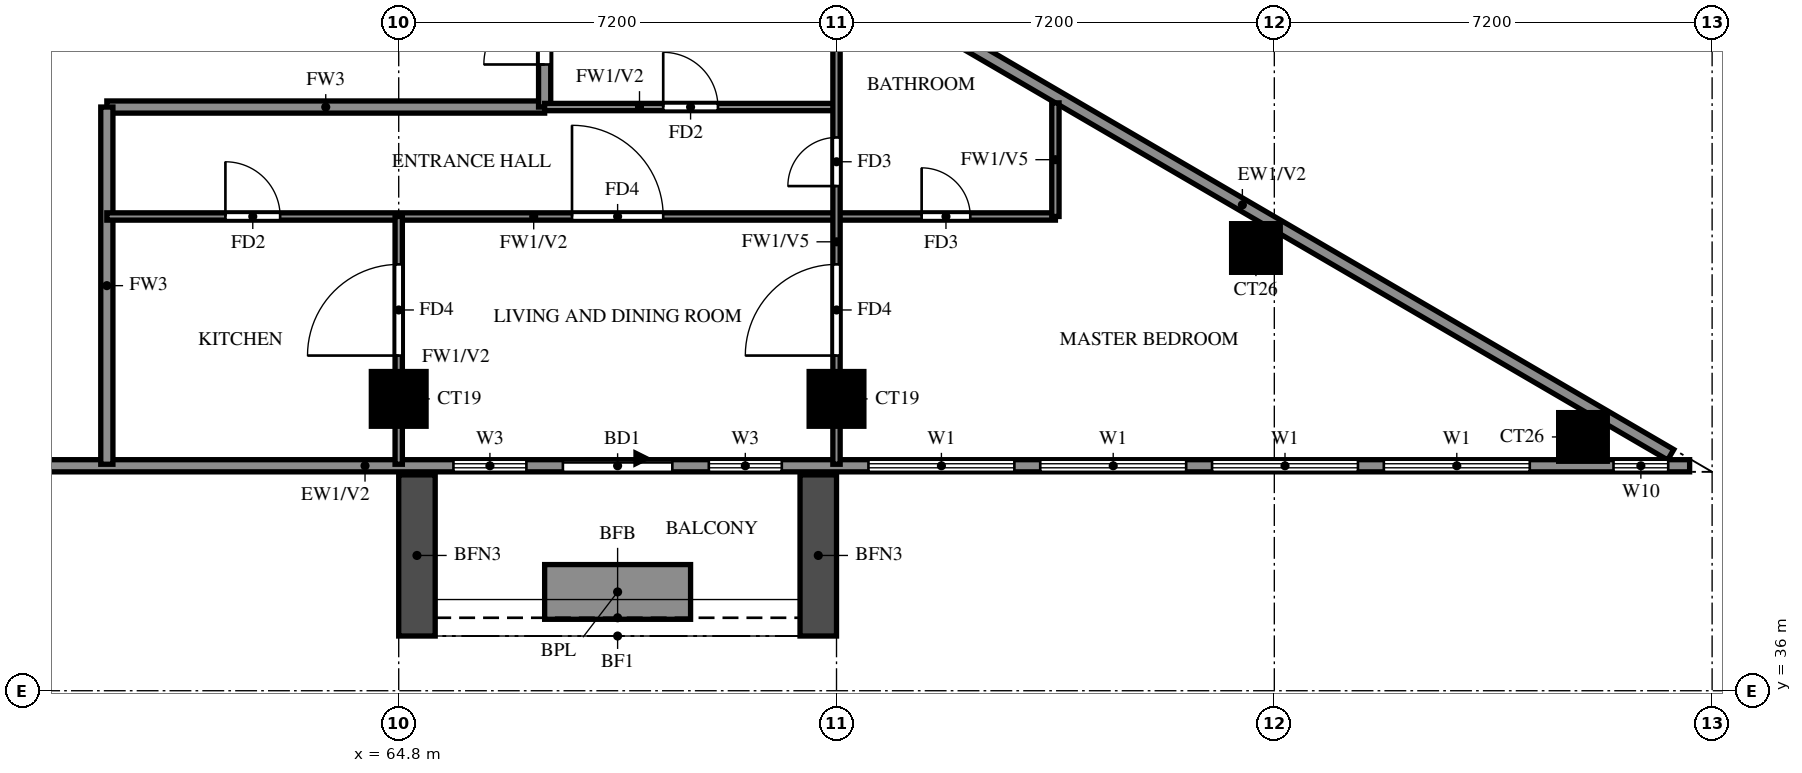
"""IFC4 building model, lengths in metres.
Left out: names, types, materials, properties, quantities, classifications, styles, units other than length and angle.
Written with IfcOpenShell. Run it as: python <this file> out.ifc"""

import sys

from ifc_helpers import new_model, si_unit, direction, frame, frame_2d, origin, origin_2d, place, context, subcontext, project, spatial, rectangle, extrude, source, transform, mapped, element, fill, save


model = new_model("IFC4")
c1 = context("Model", 3, precision=1e-05, world=origin(), true_north=direction((0.0, 1.0)))
c2 = subcontext(c1, "Body", "Model", "MODEL_VIEW")
j1 = project(units=[si_unit("LENGTHUNIT", "METRE"), si_unit("PLANEANGLEUNIT", "RADIAN")], contexts=[c1])
p1 = place(None, origin())
s1 = spatial("IfcSite", under=j1, at=p1, CompositionType="ELEMENT")
p2 = place(p1, origin())
s2 = spatial("IfcBuilding", under=s1, at=p2, CompositionType="ELEMENT")
p3 = place(p2, frame((0.0, 0.0, 188.5)))
s3 = spatial("IfcBuildingStorey", under=s2, at=p3, CompositionType="ELEMENT", Elevation=188.5)
m1 = source(origin(), c2, "Body", "SweptSolid", [
    extrude(rectangle(XDim=0.8, YDim=0.8, at=origin_2d()), origin(), (0.0, 0.0, 1.0), 3.2),
])
p4 = place(p3, frame((84.276, 40.174, 0.0), z_axis=(0.0, 0.0, 1.0), x_axis=(1.0, 0.0, 0.0)))
e1 = element("IfcColumn", 1, at=p4, inside=s3, PredefinedType="COLUMN", context=c2, shape_type="MappedRepresentation", body=[
    mapped(m1, transform((0.0, 0.0, 0.0))),
])
m2 = source(origin(), c2, "Body", "SweptSolid", [
    extrude(rectangle(XDim=0.9, YDim=0.9, at=origin_2d()), origin(), (0.0, 0.0, 1.0), 3.2),
])
for number, where, z_axis, x_axis in (
    (2, (64.8, 40.8, 0.0), (0.0, 0.0, 1.0), (1.0, 0.0, 0.0)),
    (3, (72.0, 40.8, 0.0), (0.0, 0.0, 1.0), (1.0, 0.0, 0.0)),
):
    element("IfcColumn", number, at=place(p3, frame(where, z_axis=z_axis, x_axis=x_axis)), inside=s3, PredefinedType="COLUMN", context=c2, shape_type="MappedRepresentation", body=[
        mapped(m2, transform((0.0, 0.0, 0.0))),
    ])
p5 = place(p3, frame((78.898, 43.282, 0.0), z_axis=(0.0, 0.0, 1.0), x_axis=(1.0, 0.0, 0.0)))
e4 = element("IfcColumn", 4, at=p5, inside=s3, PredefinedType="COLUMN", context=c2, shape_type="MappedRepresentation", body=[
    mapped(m1, transform((0.0, 0.0, 0.0))),
])
p6 = place(p3, frame((85.719, 39.881, 0.0), z_axis=(0.0, 0.0, 1.0), x_axis=(-0.86377618652, 0.503875678716, 0.0)))
e5 = element("IfcWall", 5, at=p6, inside=s3, PredefinedType="SOLIDWALL", context=c2, shape_type="SweptSolid", body=[
    extrude(rectangle(XDim=16.311, YDim=0.2, at=frame_2d((8.156, 0.0))), origin(), (0.0, 0.0, 1.0), 3.2),
])
p7 = place(p6, frame((13.326, 0.0, 1.5)))
e6 = element("IfcOpeningElement", 6, at=p7, cuts=e5, PredefinedType="OPENING", context=c2, shape_type="SweptSolid", body=[
    extrude(rectangle(XDim=0.9, YDim=0.9, at=frame_2d((0.45, 0.45))), frame((0.0, 0.11, 0.0), z_axis=(0.0, -1.0, 0.0), x_axis=(1.0, 0.0, 0.0)), (0.0, 0.0, 1.0), 0.22),
])
p8 = place(p3, frame((58.8, 39.7, 0.0), z_axis=(0.0, 0.0, 1.0), x_axis=(1.0, 0.0, 0.0)))
e7 = element("IfcWall", 7, at=p8, inside=s3, PredefinedType="SOLIDWALL", context=c2, shape_type="SweptSolid", body=[
    extrude(rectangle(XDim=27.23, YDim=0.2, at=frame_2d((13.615, 0.0))), origin(), (0.0, 0.0, 1.0), 3.2),
])
p9 = place(p8, frame((8.7, 0.0, 0.0)))
e8 = element("IfcOpeningElement", 8, at=p9, cuts=e7, PredefinedType="OPENING", context=c2, shape_type="SweptSolid", body=[
    extrude(rectangle(XDim=1.8, YDim=2.4, at=frame_2d((0.9, 1.2))), frame((0.0, 0.11, 0.0), z_axis=(0.0, -1.0, 0.0), x_axis=(1.0, 0.0, 0.0)), (0.0, 0.0, 1.0), 0.22),
])
p10 = place(p8, frame((6.9, 0.0, 0.6)))
e9 = element("IfcOpeningElement", 9, at=p10, cuts=e7, PredefinedType="OPENING", context=c2, shape_type="SweptSolid", body=[
    extrude(rectangle(XDim=1.2, YDim=2.4, at=frame_2d((0.6, 1.2))), frame((0.0, 0.11, 0.0), z_axis=(0.0, -1.0, 0.0), x_axis=(1.0, 0.0, 0.0)), (0.0, 0.0, 1.0), 0.22),
])
p11 = place(p8, frame((11.1, 0.0, 0.6)))
e10 = element("IfcOpeningElement", 10, at=p11, cuts=e7, PredefinedType="OPENING", context=c2, shape_type="SweptSolid", body=[
    extrude(rectangle(XDim=1.2, YDim=2.4, at=frame_2d((0.6, 1.2))), frame((0.0, 0.11, 0.0), z_axis=(0.0, -1.0, 0.0), x_axis=(1.0, 0.0, 0.0)), (0.0, 0.0, 1.0), 0.22),
])
p12 = place(p8, frame((13.725, 0.0, 0.6)))
e11 = element("IfcOpeningElement", 11, at=p12, cuts=e7, PredefinedType="OPENING", context=c2, shape_type="SweptSolid", body=[
    extrude(rectangle(XDim=2.4, YDim=2.4, at=frame_2d((1.2, 1.2))), frame((0.0, 0.11, 0.0), z_axis=(0.0, -1.0, 0.0), x_axis=(1.0, 0.0, 0.0)), (0.0, 0.0, 1.0), 0.22),
])
p13 = place(p8, frame((16.551, 0.0, 0.6)))
e12 = element("IfcOpeningElement", 12, at=p13, cuts=e7, PredefinedType="OPENING", context=c2, shape_type="SweptSolid", body=[
    extrude(rectangle(XDim=2.4, YDim=2.4, at=frame_2d((1.2, 1.2))), frame((0.0, 0.11, 0.0), z_axis=(0.0, -1.0, 0.0), x_axis=(1.0, 0.0, 0.0)), (0.0, 0.0, 1.0), 0.22),
])
p14 = place(p8, frame((19.376, 0.0, 0.6)))
e13 = element("IfcOpeningElement", 13, at=p14, cuts=e7, PredefinedType="OPENING", context=c2, shape_type="SweptSolid", body=[
    extrude(rectangle(XDim=2.4, YDim=2.4, at=frame_2d((1.2, 1.2))), frame((0.0, 0.11, 0.0), z_axis=(0.0, -1.0, 0.0), x_axis=(1.0, 0.0, 0.0)), (0.0, 0.0, 1.0), 0.22),
])
p15 = place(p8, frame((22.201, 0.0, 0.6)))
e14 = element("IfcOpeningElement", 14, at=p15, cuts=e7, PredefinedType="OPENING", context=c2, shape_type="SweptSolid", body=[
    extrude(rectangle(XDim=2.4, YDim=2.4, at=frame_2d((1.2, 1.2))), frame((0.0, 0.11, 0.0), z_axis=(0.0, -1.0, 0.0), x_axis=(1.0, 0.0, 0.0)), (0.0, 0.0, 1.0), 0.22),
])
p16 = place(p8, frame((25.978, 0.0, 0.6)))
e15 = element("IfcOpeningElement", 15, at=p16, cuts=e7, PredefinedType="OPENING", context=c2, shape_type="SweptSolid", body=[
    extrude(rectangle(XDim=0.9, YDim=2.4, at=frame_2d((0.45, 1.2))), frame((0.0, 0.11, 0.0), z_axis=(0.0, -1.0, 0.0), x_axis=(1.0, 0.0, 0.0)), (0.0, 0.0, 1.0), 0.22),
])
for number, where, z_axis, x_axis in (
    (16, (65.1, 39.55, 0.0), (0.0, 0.0, 1.0), (0.0, -1.0, 0.0)),
    (17, (71.7, 39.55, 0.0), (0.0, 0.0, 1.0), (0.0, -1.0, 0.0)),
):
    element("IfcWall", number, at=place(p3, frame(where, z_axis=z_axis, x_axis=x_axis)), inside=s3, PredefinedType="SOLIDWALL", context=c2, shape_type="SweptSolid", body=[
        extrude(rectangle(XDim=2.65, YDim=0.6, at=frame_2d((1.325, 0.0))), origin(), (0.0, 0.0, 1.0), 2.85),
    ])
p17 = place(p3, frame((67.2, 37.625, 0.0), z_axis=(0.0, 0.0, 1.0), x_axis=(1.0, 0.0, 0.0)))
e18 = element("IfcWall", 18, at=p17, inside=s3, PredefinedType="SOLIDWALL", context=c2, shape_type="SweptSolid", body=[
    extrude(rectangle(XDim=2.4, YDim=0.9, at=frame_2d((1.2, 0.0))), origin(), (0.0, 0.0, 1.0), 0.9),
])
p18 = place(p3, frame((60.0, 45.6, 0.0), z_axis=(0.0, 0.0, 1.0), x_axis=(1.0, 0.0, 0.0)))
e19 = element("IfcWall", 19, at=p18, inside=s3, PredefinedType="SOLIDWALL", context=c2, shape_type="SweptSolid", body=[
    extrude(rectangle(XDim=7.2, YDim=0.2, at=frame_2d((3.6, 0.0))), origin(), (0.0, 0.0, 1.0), 3.2),
])
p19 = place(p3, frame((60.0, 39.725, 0.0), z_axis=(0.0, 0.0, 1.0), x_axis=(0.0, 1.0, 0.0)))
e20 = element("IfcWall", 20, at=p19, inside=s3, PredefinedType="SOLIDWALL", context=c2, shape_type="SweptSolid", body=[
    extrude(rectangle(XDim=5.875, YDim=0.2, at=frame_2d((2.938, 0.0))), origin(), (0.0, 0.0, 1.0), 3.2),
])
p20 = place(p3, frame((67.2, 45.6, 0.0), z_axis=(0.0, 0.0, 1.0), x_axis=(0.0, 1.0, 0.0)))
e21 = element("IfcWall", 21, at=p20, inside=s3, PredefinedType="SOLIDWALL", context=c2, shape_type="SweptSolid", body=[
    extrude(rectangle(XDim=16.8, YDim=0.2, at=frame_2d((8.4, 0.0))), origin(), (0.0, 0.0, 1.0), 3.2),
])
p21 = place(p20, frame((8.3, 0.0, 0.0)))
e22 = element("IfcOpeningElement", 22, at=p21, cuts=e21, PredefinedType="OPENING", context=c2, shape_type="SweptSolid", body=[
    extrude(rectangle(XDim=1.0, YDim=2.1, at=frame_2d((0.5, 1.05))), frame((0.0, 0.11, 0.0), z_axis=(0.0, -1.0, 0.0), x_axis=(1.0, 0.0, 0.0)), (0.0, 0.0, 1.0), 0.22),
])
p22 = place(p20, frame((15.1, 0.0, 0.0)))
e23 = element("IfcOpeningElement", 23, at=p22, cuts=e21, PredefinedType="OPENING", context=c2, shape_type="SweptSolid", body=[
    extrude(rectangle(XDim=1.0, YDim=2.1, at=frame_2d((0.5, 1.05))), frame((0.0, 0.11, 0.0), z_axis=(0.0, -1.0, 0.0), x_axis=(1.0, 0.0, 0.0)), (0.0, 0.0, 1.0), 0.22),
])
p23 = place(p20, frame((0.7, 0.0, 0.0)))
e24 = element("IfcOpeningElement", 24, at=p23, cuts=e21, PredefinedType="OPENING", context=c2, shape_type="SweptSolid", body=[
    extrude(rectangle(XDim=1.0, YDim=2.1, at=frame_2d((0.5, 1.05))), frame((0.0, 0.11, 0.0), z_axis=(0.0, -1.0, 0.0), x_axis=(1.0, 0.0, 0.0)), (0.0, 0.0, 1.0), 0.22),
])
p24 = place(p3, frame((60.0, 43.8, 0.0), z_axis=(0.0, 0.0, 1.0), x_axis=(1.0, 0.0, 0.0)))
e25 = element("IfcWall", 25, at=p24, inside=s3, PredefinedType="PARTITIONING", context=c2, shape_type="SweptSolid", body=[
    extrude(rectangle(XDim=15.6, YDim=0.12, at=frame_2d((7.8, 0.0))), origin(), (0.0, 0.0, 1.0), 3.2),
])
p25 = place(p24, frame((7.65, 0.0, 0.0)))
e26 = element("IfcOpeningElement", 26, at=p25, cuts=e25, PredefinedType="OPENING", context=c2, shape_type="SweptSolid", body=[
    extrude(rectangle(XDim=1.5, YDim=2.1, at=frame_2d((0.75, 1.05))), frame((0.0, 0.07, 0.0), z_axis=(0.0, -1.0, 0.0), x_axis=(1.0, 0.0, 0.0)), (0.0, 0.0, 1.0), 0.14),
])
p26 = place(p24, frame((1.95, 0.0, 0.0)))
e27 = element("IfcOpeningElement", 27, at=p26, cuts=e25, PredefinedType="OPENING", context=c2, shape_type="SweptSolid", body=[
    extrude(rectangle(XDim=0.9, YDim=2.1, at=frame_2d((0.45, 1.05))), frame((0.0, 0.07, 0.0), z_axis=(0.0, -1.0, 0.0), x_axis=(1.0, 0.0, 0.0)), (0.0, 0.0, 1.0), 0.14),
])
p27 = place(p24, frame((13.4, 0.0, 0.0)))
e28 = element("IfcOpeningElement", 28, at=p27, cuts=e25, PredefinedType="OPENING", context=c2, shape_type="SweptSolid", body=[
    extrude(rectangle(XDim=0.8, YDim=2.1, at=frame_2d((0.4, 1.05))), frame((0.0, 0.07, 0.0), z_axis=(0.0, -1.0, 0.0), x_axis=(1.0, 0.0, 0.0)), (0.0, 0.0, 1.0), 0.14),
])
p28 = place(p3, frame((67.2, 45.6, 0.0), z_axis=(0.0, 0.0, 1.0), x_axis=(1.0, 0.0, 0.0)))
e29 = element("IfcWall", 29, at=p28, inside=s3, PredefinedType="PARTITIONING", context=c2, shape_type="SweptSolid", body=[
    extrude(rectangle(XDim=4.8, YDim=0.12, at=frame_2d((2.4, 0.0))), origin(), (0.0, 0.0, 1.0), 3.2),
])
p29 = place(p28, frame((1.95, 0.0, 0.0)))
e30 = element("IfcOpeningElement", 30, at=p29, cuts=e29, PredefinedType="OPENING", context=c2, shape_type="SweptSolid", body=[
    extrude(rectangle(XDim=0.9, YDim=2.1, at=frame_2d((0.45, 1.05))), frame((0.0, 0.07, 0.0), z_axis=(0.0, -1.0, 0.0), x_axis=(1.0, 0.0, 0.0)), (0.0, 0.0, 1.0), 0.14),
])
p30 = place(p3, frame((64.8, 39.725, 0.0), z_axis=(0.0, 0.0, 1.0), x_axis=(0.0, 1.0, 0.0)))
e31 = element("IfcWall", 31, at=p30, inside=s3, PredefinedType="PARTITIONING", context=c2, shape_type="SweptSolid", body=[
    extrude(rectangle(XDim=4.075, YDim=0.12, at=frame_2d((2.038, 0.0))), origin(), (0.0, 0.0, 1.0), 3.2),
])
p31 = place(p30, frame((1.788, 0.0, 0.0)))
e32 = element("IfcOpeningElement", 32, at=p31, cuts=e31, PredefinedType="OPENING", context=c2, shape_type="SweptSolid", body=[
    extrude(rectangle(XDim=1.5, YDim=2.1, at=frame_2d((0.75, 1.05))), frame((0.0, 0.07, 0.0), z_axis=(0.0, -1.0, 0.0), x_axis=(1.0, 0.0, 0.0)), (0.0, 0.0, 1.0), 0.14),
])
p32 = place(p3, frame((72.0, 39.725, 0.0), z_axis=(0.0, 0.0, 1.0), x_axis=(0.0, 1.0, 0.0)))
e33 = element("IfcWall", 33, at=p32, inside=s3, PredefinedType="PARTITIONING", context=c2, shape_type="SweptSolid", body=[
    extrude(rectangle(XDim=8.13, YDim=0.12, at=frame_2d((4.065, 0.0))), origin(), (0.0, 0.0, 1.0), 2.3),
])
p33 = place(p32, frame((1.788, 0.0, 0.0)))
e34 = element("IfcOpeningElement", 34, at=p33, cuts=e33, PredefinedType="OPENING", context=c2, shape_type="SweptSolid", body=[
    extrude(rectangle(XDim=1.5, YDim=2.1, at=frame_2d((0.75, 1.05))), frame((0.0, 0.07, 0.0), z_axis=(0.0, -1.0, 0.0), x_axis=(1.0, 0.0, 0.0)), (0.0, 0.0, 1.0), 0.14),
])
p34 = place(p32, frame((4.575, 0.0, 0.0)))
e35 = element("IfcOpeningElement", 35, at=p34, cuts=e33, PredefinedType="OPENING", context=c2, shape_type="SweptSolid", body=[
    extrude(rectangle(XDim=0.8, YDim=2.1, at=frame_2d((0.4, 1.05))), frame((0.0, 0.07, 0.0), z_axis=(0.0, -1.0, 0.0), x_axis=(1.0, 0.0, 0.0)), (0.0, 0.0, 1.0), 0.14),
])
p35 = place(p3, frame((75.6, 43.8, 0.0), z_axis=(0.0, 0.0, 1.0), x_axis=(0.0, 1.0, 0.0)))
e36 = element("IfcWall", 36, at=p35, inside=s3, PredefinedType="PARTITIONING", context=c2, shape_type="SweptSolid", body=[
    extrude(rectangle(XDim=1.868, YDim=0.12, at=frame_2d((0.934, 0.0))), origin(), (0.0, 0.0, 1.0), 2.3),
])
p36 = place(p9, origin())
e37 = element("IfcDoor", 37, at=p36, inside=s3, OperationType="DOUBLE_DOOR_SLIDING", PredefinedType="DOOR", context=c2, shape_type="SweptSolid", body=[
    extrude(rectangle(XDim=1.8, YDim=2.4, at=frame_2d((0.9, 1.2))), frame((0.0, 0.025, 0.0), z_axis=(0.0, -1.0, 0.0), x_axis=(1.0, 0.0, 0.0)), (0.0, 0.0, 1.0), 0.05),
])
fill(e8, e37)
p37 = place(p10, origin())
e38 = element("IfcWindow", 38, at=p37, inside=s3, PartitioningType="SINGLE_PANEL", PredefinedType="WINDOW", context=c2, shape_type="SweptSolid", body=[
    extrude(rectangle(XDim=1.2, YDim=2.4, at=frame_2d((0.6, 1.2))), frame((0.0, 0.03, 0.0), z_axis=(0.0, -1.0, 0.0), x_axis=(1.0, 0.0, 0.0)), (0.0, 0.0, 1.0), 0.06),
])
fill(e9, e38)
p38 = place(p11, origin())
e39 = element("IfcWindow", 39, at=p38, inside=s3, PartitioningType="SINGLE_PANEL", PredefinedType="WINDOW", context=c2, shape_type="SweptSolid", body=[
    extrude(rectangle(XDim=1.2, YDim=2.4, at=frame_2d((0.6, 1.2))), frame((0.0, 0.03, 0.0), z_axis=(0.0, -1.0, 0.0), x_axis=(1.0, 0.0, 0.0)), (0.0, 0.0, 1.0), 0.06),
])
fill(e10, e39)
p39 = place(p12, origin())
e40 = element("IfcWindow", 40, at=p39, inside=s3, PartitioningType="DOUBLE_PANEL_VERTICAL", PredefinedType="WINDOW", context=c2, shape_type="SweptSolid", body=[
    extrude(rectangle(XDim=2.4, YDim=2.4, at=frame_2d((1.2, 1.2))), frame((0.0, 0.03, 0.0), z_axis=(0.0, -1.0, 0.0), x_axis=(1.0, 0.0, 0.0)), (0.0, 0.0, 1.0), 0.06),
])
fill(e11, e40)
p40 = place(p13, origin())
e41 = element("IfcWindow", 41, at=p40, inside=s3, PartitioningType="DOUBLE_PANEL_VERTICAL", PredefinedType="WINDOW", context=c2, shape_type="SweptSolid", body=[
    extrude(rectangle(XDim=2.4, YDim=2.4, at=frame_2d((1.2, 1.2))), frame((0.0, 0.03, 0.0), z_axis=(0.0, -1.0, 0.0), x_axis=(1.0, 0.0, 0.0)), (0.0, 0.0, 1.0), 0.06),
])
fill(e12, e41)
p41 = place(p14, origin())
e42 = element("IfcWindow", 42, at=p41, inside=s3, PartitioningType="DOUBLE_PANEL_VERTICAL", PredefinedType="WINDOW", context=c2, shape_type="SweptSolid", body=[
    extrude(rectangle(XDim=2.4, YDim=2.4, at=frame_2d((1.2, 1.2))), frame((0.0, 0.03, 0.0), z_axis=(0.0, -1.0, 0.0), x_axis=(1.0, 0.0, 0.0)), (0.0, 0.0, 1.0), 0.06),
])
fill(e13, e42)
p42 = place(p15, origin())
e43 = element("IfcWindow", 43, at=p42, inside=s3, PartitioningType="DOUBLE_PANEL_VERTICAL", PredefinedType="WINDOW", context=c2, shape_type="SweptSolid", body=[
    extrude(rectangle(XDim=2.4, YDim=2.4, at=frame_2d((1.2, 1.2))), frame((0.0, 0.03, 0.0), z_axis=(0.0, -1.0, 0.0), x_axis=(1.0, 0.0, 0.0)), (0.0, 0.0, 1.0), 0.06),
])
fill(e14, e43)
p43 = place(p16, origin())
e44 = element("IfcWindow", 44, at=p43, inside=s3, PartitioningType="SINGLE_PANEL", PredefinedType="WINDOW", context=c2, shape_type="SweptSolid", body=[
    extrude(rectangle(XDim=0.9, YDim=2.4, at=frame_2d((0.45, 1.2))), frame((0.0, 0.03, 0.0), z_axis=(0.0, -1.0, 0.0), x_axis=(1.0, 0.0, 0.0)), (0.0, 0.0, 1.0), 0.06),
])
fill(e15, e44)
p44 = place(p31, origin())
e45 = element("IfcDoor", 45, at=p44, inside=s3, OperationType="SINGLE_SWING_RIGHT", PredefinedType="DOOR", context=c2, shape_type="SweptSolid", body=[
    extrude(rectangle(XDim=1.5, YDim=2.1, at=frame_2d((0.75, 1.05))), frame((0.0, 0.025, 0.0), z_axis=(0.0, -1.0, 0.0), x_axis=(1.0, 0.0, 0.0)), (0.0, 0.0, 1.0), 0.05),
])
fill(e32, e45)
p45 = place(p29, origin())
e46 = element("IfcDoor", 46, at=p45, inside=s3, OperationType="SINGLE_SWING_LEFT", PredefinedType="DOOR", context=c2, shape_type="SweptSolid", body=[
    extrude(rectangle(XDim=0.9, YDim=2.1, at=frame_2d((0.45, 1.05))), frame((0.0, 0.025, 0.0), z_axis=(0.0, -1.0, 0.0), x_axis=(1.0, 0.0, 0.0)), (0.0, 0.0, 1.0), 0.05),
])
fill(e30, e46)
p46 = place(p23, origin())
e47 = element("IfcDoor", 47, at=p46, inside=s3, OperationType="SINGLE_SWING_RIGHT", PredefinedType="DOOR", context=c2, shape_type="SweptSolid", body=[
    extrude(rectangle(XDim=1.0, YDim=2.1, at=frame_2d((0.5, 1.05))), frame((0.0, 0.025, 0.0), z_axis=(0.0, -1.0, 0.0), x_axis=(1.0, 0.0, 0.0)), (0.0, 0.0, 1.0), 0.05),
])
fill(e24, e47)
p47 = place(p25, origin())
e48 = element("IfcDoor", 48, at=p47, inside=s3, OperationType="SINGLE_SWING_LEFT", PredefinedType="DOOR", context=c2, shape_type="SweptSolid", body=[
    extrude(rectangle(XDim=1.5, YDim=2.1, at=frame_2d((0.75, 1.05))), frame((0.0, 0.025, 0.0), z_axis=(0.0, -1.0, 0.0), x_axis=(1.0, 0.0, 0.0)), (0.0, 0.0, 1.0), 0.05),
])
fill(e26, e48)
p48 = place(p26, origin())
e49 = element("IfcDoor", 49, at=p48, inside=s3, OperationType="SINGLE_SWING_LEFT", PredefinedType="DOOR", context=c2, shape_type="SweptSolid", body=[
    extrude(rectangle(XDim=0.9, YDim=2.1, at=frame_2d((0.45, 1.05))), frame((0.0, 0.025, 0.0), z_axis=(0.0, -1.0, 0.0), x_axis=(1.0, 0.0, 0.0)), (0.0, 0.0, 1.0), 0.05),
])
fill(e27, e49)
p49 = place(p33, origin())
e50 = element("IfcDoor", 50, at=p49, inside=s3, OperationType="SINGLE_SWING_LEFT", PredefinedType="DOOR", context=c2, shape_type="SweptSolid", body=[
    extrude(rectangle(XDim=1.5, YDim=2.1, at=frame_2d((0.75, 1.05))), frame((0.0, 0.025, 0.0), z_axis=(0.0, -1.0, 0.0), x_axis=(1.0, 0.0, 0.0)), (0.0, 0.0, 1.0), 0.05),
])
fill(e34, e50)
p50 = place(p34, origin())
e51 = element("IfcDoor", 51, at=p50, inside=s3, OperationType="SINGLE_SWING_LEFT", PredefinedType="DOOR", context=c2, shape_type="SweptSolid", body=[
    extrude(rectangle(XDim=0.8, YDim=2.1, at=frame_2d((0.4, 1.05))), frame((0.0, 0.025, 0.0), z_axis=(0.0, -1.0, 0.0), x_axis=(1.0, 0.0, 0.0)), (0.0, 0.0, 1.0), 0.05),
])
fill(e35, e51)
p51 = place(p27, origin())
e52 = element("IfcDoor", 52, at=p51, inside=s3, OperationType="SINGLE_SWING_LEFT", PredefinedType="DOOR", context=c2, shape_type="SweptSolid", body=[
    extrude(rectangle(XDim=0.8, YDim=2.1, at=frame_2d((0.4, 1.05))), frame((0.0, 0.025, 0.0), z_axis=(0.0, -1.0, 0.0), x_axis=(1.0, 0.0, 0.0)), (0.0, 0.0, 1.0), 0.05),
])
fill(e28, e52)
save(model, sys.argv[1])
